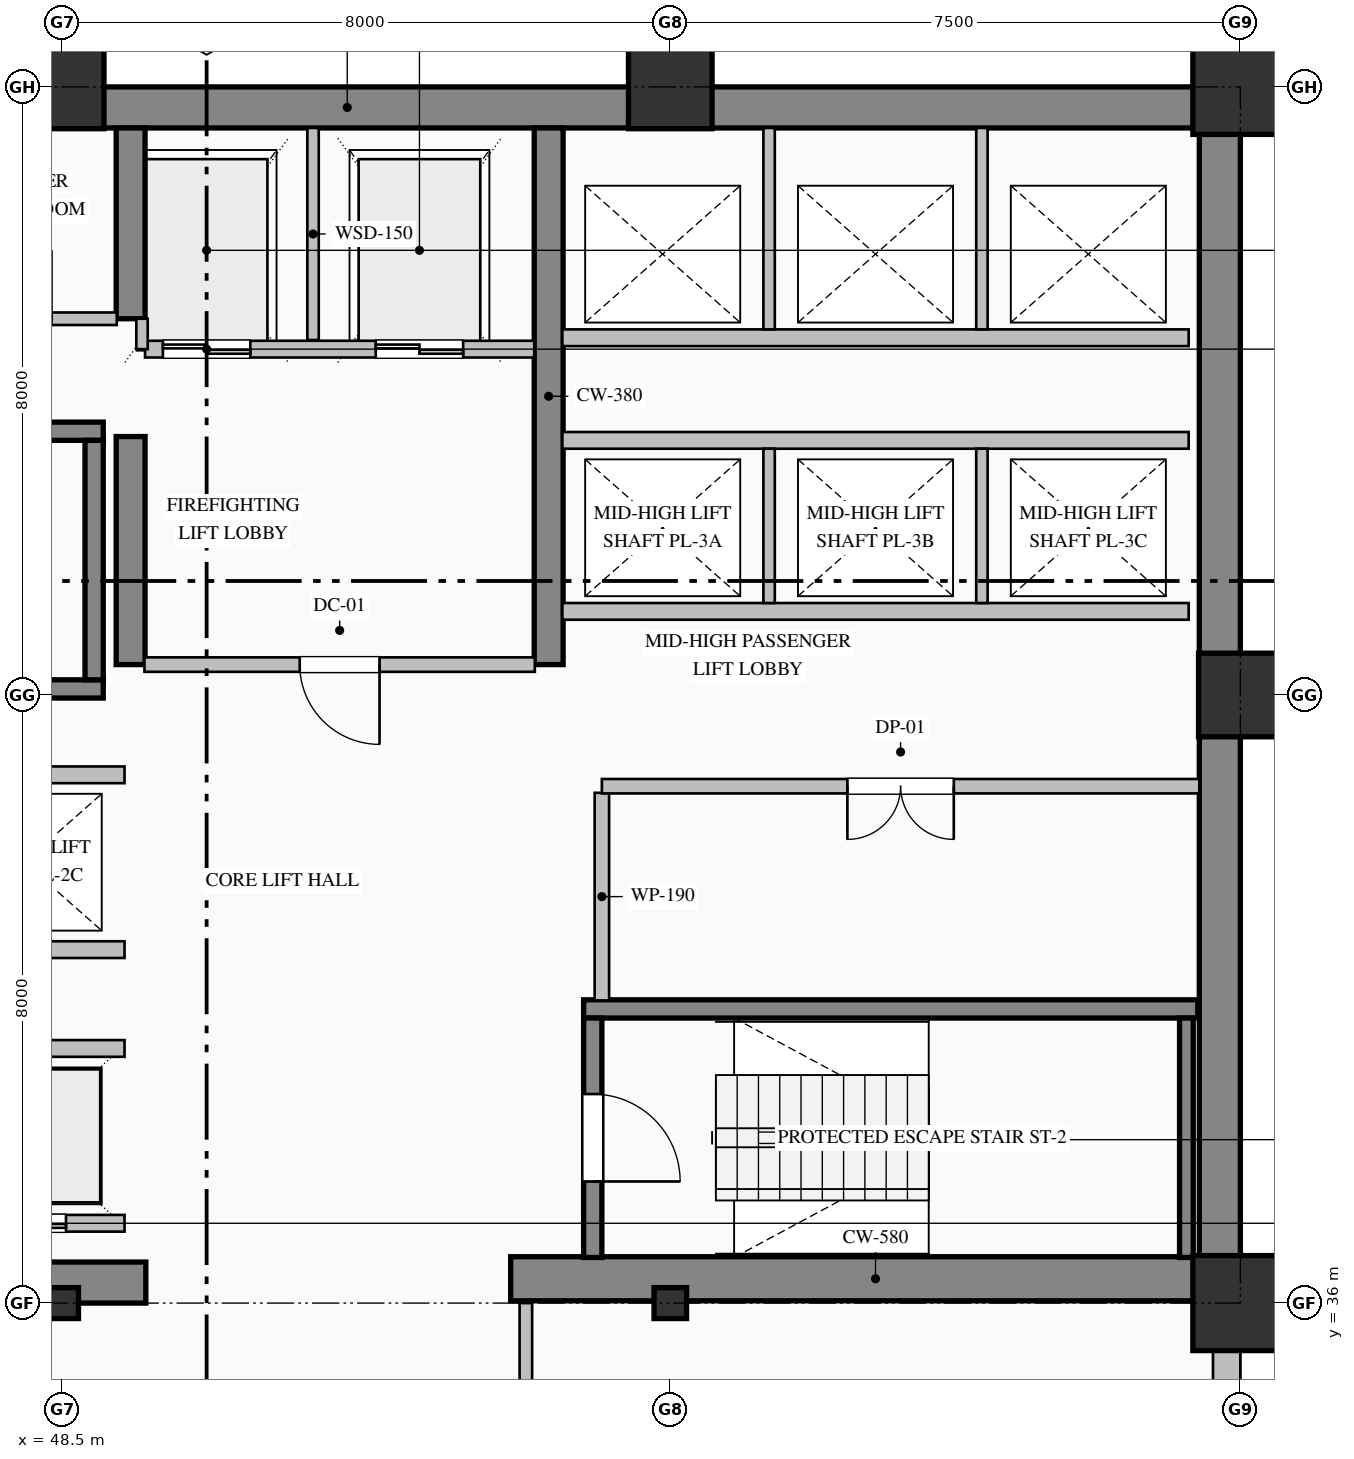
"""IFC4 building model, lengths in metres.
Left out: names, types, materials, properties, quantities, classifications, styles, units other than length and angle.
Written with IfcOpenShell. Run it as: python <this file> out.ifc"""

import sys

from ifc_helpers import new_model, si_unit, direction, frame, frame_2d, origin, origin_2d, place, context, subcontext, project, spatial, rectangle, hollow_rectangle, i_section, extrude, element, fill, save


model = new_model("IFC4")
c1 = context("Model", 3, precision=1e-05, world=origin(), true_north=direction((0.0, 1.0)))
c2 = subcontext(c1, "Body", "Model", "MODEL_VIEW")
j1 = project(units=[si_unit("LENGTHUNIT", "METRE"), si_unit("PLANEANGLEUNIT", "RADIAN")], contexts=[c1])
p1 = place(None, origin())
s1 = spatial("IfcSite", under=j1, at=p1, CompositionType="ELEMENT")
p2 = place(p1, origin())
s2 = spatial("IfcBuilding", under=s1, at=p2, CompositionType="ELEMENT")
p3 = place(p2, frame((0.0, 0.0, 88.2)))
s3 = spatial("IfcBuildingStorey", under=s2, at=p3, CompositionType="ELEMENT", Elevation=88.2)
p4 = place(p3, frame((40.5, 51.73, 0.0), z_axis=(0.0, 0.0, 1.0), x_axis=(1.0, 0.0, 0.0)))
e1 = element("IfcWall", 1, at=p4, inside=s3, PredefinedType="SHEAR", context=c2, shape_type="SweptSolid", body=[
    extrude(rectangle(XDim=23.5, YDim=0.54, at=frame_2d((11.75, 0.0))), origin(), (0.0, 0.0, 1.0), 3.75),
])
p5 = place(p3, frame((63.73, 36.32, 0.0), z_axis=(0.0, 0.0, 1.0), x_axis=(0.0, 1.0, 0.0)))
e2 = element("IfcWall", 2, at=p5, inside=s3, PredefinedType="SHEAR", context=c2, shape_type="SweptSolid", body=[
    extrude(rectangle(XDim=15.14, YDim=0.54, at=frame_2d((7.57, 0.0))), origin(), (0.0, 0.0, 1.0), 3.75),
])
p6 = place(p3, frame((48.2, 36.27, 0.0), z_axis=(0.0, 0.0, 1.0), x_axis=(1.0, 0.0, 0.0)))
e3 = element("IfcWall", 3, at=p6, inside=s3, PredefinedType="SHEAR", context=c2, shape_type="SweptSolid", body=[
    extrude(rectangle(XDim=1.4, YDim=0.54, at=frame_2d((0.7, 0.0))), origin(), (0.0, 0.0, 1.0), 3.75),
])
p7 = place(p3, frame((54.4, 36.32, 0.0), z_axis=(0.0, 0.0, 1.0), x_axis=(1.0, 0.0, 0.0)))
e4 = element("IfcWall", 4, at=p7, inside=s3, PredefinedType="SHEAR", context=c2, shape_type="SweptSolid", body=[
    extrude(rectangle(XDim=9.6, YDim=0.58, at=frame_2d((4.8, 0.0))), origin(), (0.0, 0.0, 1.0), 4.0),
])
p8 = place(p3, frame((49.4, 44.4, 0.0), z_axis=(0.0, 0.0, 1.0), x_axis=(0.0, 1.0, 0.0)))
e5 = element("IfcWall", 5, at=p8, inside=s3, PredefinedType="SHEAR", context=c2, shape_type="SweptSolid", body=[
    extrude(rectangle(XDim=3.0, YDim=0.38, at=frame_2d((1.5, 0.0))), origin(), (0.0, 0.0, 1.0), 3.75),
])
p9 = place(p3, frame((49.4, 48.95, 0.0), z_axis=(0.0, 0.0, 1.0), x_axis=(0.0, 1.0, 0.0)))
e6 = element("IfcWall", 6, at=p9, inside=s3, PredefinedType="SHEAR", context=c2, shape_type="SweptSolid", body=[
    extrude(rectangle(XDim=2.51, YDim=0.38, at=frame_2d((1.255, 0.0))), origin(), (0.0, 0.0, 1.0), 3.75),
])
p10 = place(p3, frame((54.9, 44.4, 0.0), z_axis=(0.0, 0.0, 1.0), x_axis=(0.0, 1.0, 0.0)))
e7 = element("IfcWall", 7, at=p10, inside=s3, PredefinedType="SHEAR", context=c2, shape_type="SweptSolid", body=[
    extrude(rectangle(XDim=7.06, YDim=0.38, at=frame_2d((3.53, 0.0))), origin(), (0.0, 0.0, 1.0), 3.75),
])
p11 = place(p3, frame((48.5, 36.0, 0.0), z_axis=(0.0, 0.0, 1.0), x_axis=(1.0, 0.0, 0.0)))
e8 = element("IfcColumn", 8, at=p11, inside=s3, PredefinedType="COLUMN", context=c2, shape_type="SweptSolid", body=[
    extrude(i_section(OverallWidth=0.407, OverallDepth=0.428, WebThickness=0.02, FlangeThickness=0.035, FilletRadius=0.022, at=origin_2d()), origin(), (0.0, 0.0, 1.0), 4.0),
])
p12 = place(p3, frame((48.5, 52.0, 0.0), z_axis=(0.0, 0.0, 1.0), x_axis=(1.0, 0.0, 0.0)))
e9 = element("IfcColumn", 9, at=p12, inside=s3, PredefinedType="COLUMN", context=c2, shape_type="SweptSolid", body=[
    extrude(hollow_rectangle(XDim=1.1, YDim=1.1, WallThickness=0.04, at=origin_2d()), origin(), (0.0, 0.0, 1.0), 4.0),
])
p13 = place(p3, frame((56.5, 36.0, 0.0), z_axis=(0.0, 0.0, 1.0), x_axis=(1.0, 0.0, 0.0)))
e10 = element("IfcColumn", 10, at=p13, inside=s3, PredefinedType="COLUMN", context=c2, shape_type="SweptSolid", body=[
    extrude(i_section(OverallWidth=0.407, OverallDepth=0.428, WebThickness=0.02, FlangeThickness=0.035, FilletRadius=0.022, at=origin_2d()), origin(), (0.0, 0.0, 1.0), 4.0),
])
p14 = place(p3, frame((56.5, 52.0, 0.0), z_axis=(0.0, 0.0, 1.0), x_axis=(1.0, 0.0, 0.0)))
e11 = element("IfcColumn", 11, at=p14, inside=s3, PredefinedType="COLUMN", context=c2, shape_type="SweptSolid", body=[
    extrude(hollow_rectangle(XDim=1.1, YDim=1.1, WallThickness=0.04, at=origin_2d()), origin(), (0.0, 0.0, 1.0), 4.0),
])
p15 = place(p3, frame((64.0, 36.0, 0.0), z_axis=(0.0, 0.0, 1.0), x_axis=(1.0, 0.0, 0.0)))
e12 = element("IfcColumn", 12, at=p15, inside=s3, PredefinedType="COLUMN", context=c2, shape_type="SweptSolid", body=[
    extrude(hollow_rectangle(XDim=1.25, YDim=1.25, WallThickness=0.045, at=origin_2d()), origin(), (0.0, 0.0, 1.0), 4.0),
])
p16 = place(p3, frame((64.0, 44.0, 0.0), z_axis=(0.0, 0.0, 1.0), x_axis=(1.0, 0.0, 0.0)))
e13 = element("IfcColumn", 13, at=p16, inside=s3, PredefinedType="COLUMN", context=c2, shape_type="SweptSolid", body=[
    extrude(hollow_rectangle(XDim=1.1, YDim=1.1, WallThickness=0.04, at=origin_2d()), origin(), (0.0, 0.0, 1.0), 4.0),
])
p17 = place(p3, frame((64.0, 52.0, 0.0), z_axis=(0.0, 0.0, 1.0), x_axis=(1.0, 0.0, 0.0)))
e14 = element("IfcColumn", 14, at=p17, inside=s3, PredefinedType="COLUMN", context=c2, shape_type="SweptSolid", body=[
    extrude(hollow_rectangle(XDim=1.25, YDim=1.25, WallThickness=0.045, at=origin_2d()), origin(), (0.0, 0.0, 1.0), 4.0),
])
p18 = place(p3, frame((63.82, 36.05, 0.0), z_axis=(0.0, 0.0, 1.0), x_axis=(0.0, -1.0, 0.0)))
e15 = element("IfcWall", 15, at=p18, inside=s3, PredefinedType="SOLIDWALL", context=c2, shape_type="SweptSolid", body=[
    extrude(rectangle(XDim=28.05, YDim=0.36, at=frame_2d((14.025, 0.0))), origin(), (0.0, 0.0, 1.0), 3.25),
])
p19 = place(p18, frame((2.7, 0.0, 0.85)))
e16 = element("IfcOpeningElement", 16, at=p19, cuts=e15, PredefinedType="OPENING", context=c2, shape_type="SweptSolid", body=[
    extrude(rectangle(XDim=1.8, YDim=2.05, at=frame_2d((0.9, 1.025))), frame((0.0, 0.19, 0.0), z_axis=(0.0, -1.0, 0.0), x_axis=(1.0, 0.0, 0.0)), (0.0, 0.0, 1.0), 0.38),
])
p20 = place(p18, frame((13.5, 0.0, 0.85)))
e17 = element("IfcOpeningElement", 17, at=p20, cuts=e15, PredefinedType="OPENING", context=c2, shape_type="SweptSolid", body=[
    extrude(rectangle(XDim=1.8, YDim=2.05, at=frame_2d((0.9, 1.025))), frame((0.0, 0.19, 0.0), z_axis=(0.0, -1.0, 0.0), x_axis=(1.0, 0.0, 0.0)), (0.0, 0.0, 1.0), 0.38),
])
for number, where, z_axis, x_axis in (
    (18, (40.96, 47.47, 0.0), (0.0, 0.0, 1.0), (1.0, 0.0, 0.0)),
    (19, (49.04, 44.08, 0.0), (0.0, 0.0, 1.0), (-1.0, 0.0, 0.0)),
):
    element("IfcWall", number, at=place(p3, frame(where, z_axis=z_axis, x_axis=x_axis)), inside=s3, PredefinedType="SOLIDWALL", context=c2, shape_type="SweptSolid", body=[
        extrude(rectangle(XDim=8.08, YDim=0.24, at=frame_2d((4.04, 0.0))), origin(), (0.0, 0.0, 1.0), 4.0),
    ])
p21 = place(p3, frame((48.92, 44.2, 0.0), z_axis=(0.0, 0.0, 1.0), x_axis=(0.0, 1.0, 0.0)))
e20 = element("IfcWall", 20, at=p21, inside=s3, PredefinedType="SOLIDWALL", context=c2, shape_type="SweptSolid", body=[
    extrude(rectangle(XDim=3.15, YDim=0.24, at=frame_2d((1.575, 0.0))), origin(), (0.0, 0.0, 1.0), 4.0),
])
p22 = place(p3, frame((55.36, 39.87, 0.0), z_axis=(0.0, 0.0, 1.0), x_axis=(1.0, 0.0, 0.0)))
e21 = element("IfcWall", 21, at=p22, inside=s3, PredefinedType="SOLIDWALL", context=c2, shape_type="SweptSolid", body=[
    extrude(rectangle(XDim=8.08, YDim=0.24, at=frame_2d((4.04, 0.0))), origin(), (0.0, 0.0, 1.0), 4.0),
])
p23 = place(p3, frame((55.48, 39.75, 0.0), z_axis=(0.0, 0.0, 1.0), x_axis=(0.0, -1.0, 0.0)))
e22 = element("IfcWall", 22, at=p23, inside=s3, PredefinedType="SOLIDWALL", context=c2, shape_type="SweptSolid", body=[
    extrude(rectangle(XDim=3.15, YDim=0.24, at=frame_2d((1.575, 0.0))), origin(), (0.0, 0.0, 1.0), 4.0),
])
p24 = place(p23, frame((1.0, 0.0, 0.0)))
e23 = element("IfcOpeningElement", 23, at=p24, cuts=e22, PredefinedType="OPENING", context=c2, shape_type="SweptSolid", body=[
    extrude(rectangle(XDim=1.15, YDim=2.2, at=frame_2d((0.575, 1.1))), frame((0.0, 0.13, 0.0), z_axis=(0.0, -1.0, 0.0), x_axis=(1.0, 0.0, 0.0)), (0.0, 0.0, 1.0), 0.26),
])
p25 = place(p3, frame((63.29, 36.6, 0.0), z_axis=(0.0, 0.0, 1.0), x_axis=(0.0, 1.0, 0.0)))
e24 = element("IfcWall", 24, at=p25, inside=s3, PredefinedType="SOLIDWALL", context=c2, shape_type="SweptSolid", body=[
    extrude(rectangle(XDim=3.15, YDim=0.18, at=frame_2d((1.575, 0.0))), origin(), (0.0, 0.0, 1.0), 4.0),
])
p26 = place(p3, frame((54.71, 48.55, 0.0), z_axis=(0.0, 0.0, 1.0), x_axis=(-1.0, 0.0, 0.0)))
e25 = element("IfcWall", 25, at=p26, inside=s3, PredefinedType="PARTITIONING", context=c2, shape_type="SweptSolid", body=[
    extrude(rectangle(XDim=5.12, YDim=0.22, at=frame_2d((2.56, 0.0))), origin(), (0.0, 0.0, 1.0), 3.75),
])
p27 = place(p26, frame((3.735, 0.0, 0.0)))
e26 = element("IfcOpeningElement", 26, at=p27, cuts=e25, PredefinedType="OPENING", context=c2, shape_type="SweptSolid", body=[
    extrude(rectangle(XDim=1.15, YDim=2.2, at=frame_2d((0.575, 1.1))), frame((0.0, 0.12, 0.0), z_axis=(0.0, -1.0, 0.0), x_axis=(1.0, 0.0, 0.0)), (0.0, 0.0, 1.0), 0.24),
])
p28 = place(p26, frame((0.935, 0.0, 0.0)))
e27 = element("IfcOpeningElement", 27, at=p28, cuts=e25, PredefinedType="OPENING", context=c2, shape_type="SweptSolid", body=[
    extrude(rectangle(XDim=1.15, YDim=2.2, at=frame_2d((0.575, 1.1))), frame((0.0, 0.12, 0.0), z_axis=(0.0, -1.0, 0.0), x_axis=(1.0, 0.0, 0.0)), (0.0, 0.0, 1.0), 0.24),
])
p29 = place(p3, frame((51.8, 48.67, 0.0), z_axis=(0.0, 0.0, 1.0), x_axis=(0.0, 1.0, 0.0)))
e28 = element("IfcWall", 28, at=p29, inside=s3, PredefinedType="PARTITIONING", context=c2, shape_type="SweptSolid", body=[
    extrude(rectangle(XDim=2.79, YDim=0.15, at=frame_2d((1.395, 0.0))), origin(), (0.0, 0.0, 1.0), 3.75),
])
p30 = place(p3, frame((49.55, 48.55, 0.0), z_axis=(0.0, 0.0, 1.0), x_axis=(0.0, 1.0, 0.0)))
e29 = element("IfcWall", 29, at=p30, inside=s3, PredefinedType="PARTITIONING", context=c2, shape_type="SweptSolid", body=[
    extrude(rectangle(XDim=0.4, YDim=0.15, at=frame_2d((0.2, 0.0))), origin(), (0.0, 0.0, 1.0), 3.75),
])
p31 = place(p3, frame((49.32, 37.05, 0.0), z_axis=(0.0, 0.0, 1.0), x_axis=(-1.0, 0.0, 0.0)))
e30 = element("IfcWall", 30, at=p31, inside=s3, PredefinedType="PARTITIONING", context=c2, shape_type="SweptSolid", body=[
    extrude(rectangle(XDim=8.24, YDim=0.22, at=frame_2d((4.12, 0.0))), origin(), (0.0, 0.0, 1.0), 3.75),
])
p32 = place(p31, frame((6.37, 0.0, 0.0)))
e31 = element("IfcOpeningElement", 31, at=p32, cuts=e30, PredefinedType="OPENING", context=c2, shape_type="SweptSolid", body=[
    extrude(rectangle(XDim=1.1, YDim=2.2, at=frame_2d((0.55, 1.1))), frame((0.0, 0.12, 0.0), z_axis=(0.0, -1.0, 0.0), x_axis=(1.0, 0.0, 0.0)), (0.0, 0.0, 1.0), 0.24),
])
p33 = place(p31, frame((3.57, 0.0, 0.0)))
e32 = element("IfcOpeningElement", 32, at=p33, cuts=e30, PredefinedType="OPENING", context=c2, shape_type="SweptSolid", body=[
    extrude(rectangle(XDim=1.1, YDim=2.2, at=frame_2d((0.55, 1.1))), frame((0.0, 0.12, 0.0), z_axis=(0.0, -1.0, 0.0), x_axis=(1.0, 0.0, 0.0)), (0.0, 0.0, 1.0), 0.24),
])
p34 = place(p31, frame((0.77, 0.0, 0.0)))
e33 = element("IfcOpeningElement", 33, at=p34, cuts=e30, PredefinedType="OPENING", context=c2, shape_type="SweptSolid", body=[
    extrude(rectangle(XDim=1.1, YDim=2.2, at=frame_2d((0.55, 1.1))), frame((0.0, 0.12, 0.0), z_axis=(0.0, -1.0, 0.0), x_axis=(1.0, 0.0, 0.0)), (0.0, 0.0, 1.0), 0.24),
])
for number, where, z_axis, x_axis in (
    (34, (41.08, 39.35, 0.0), (0.0, 0.0, 1.0), (1.0, 0.0, 0.0)),
    (35, (49.32, 40.65, 0.0), (0.0, 0.0, 1.0), (-1.0, 0.0, 0.0)),
    (36, (41.08, 42.95, 0.0), (0.0, 0.0, 1.0), (1.0, 0.0, 0.0)),
    (37, (63.32, 45.1, 0.0), (0.0, 0.0, 1.0), (-1.0, 0.0, 0.0)),
    (38, (55.08, 47.35, 0.0), (0.0, 0.0, 1.0), (1.0, 0.0, 0.0)),
):
    element("IfcWall", number, at=place(p3, frame(where, z_axis=z_axis, x_axis=x_axis)), inside=s3, PredefinedType="PARTITIONING", context=c2, shape_type="SweptSolid", body=[
        extrude(rectangle(XDim=8.24, YDim=0.22, at=frame_2d((4.12, 0.0))), origin(), (0.0, 0.0, 1.0), 3.75),
    ])
for number, where, z_axis, x_axis in (
    (39, (57.8, 45.21, 0.0), (0.0, 0.0, 1.0), (0.0, 1.0, 0.0)),
    (40, (60.6, 45.21, 0.0), (0.0, 0.0, 1.0), (0.0, 1.0, 0.0)),
):
    element("IfcWall", number, at=place(p3, frame(where, z_axis=z_axis, x_axis=x_axis)), inside=s3, PredefinedType="PARTITIONING", context=c2, shape_type="SweptSolid", body=[
        extrude(rectangle(XDim=2.03, YDim=0.15, at=frame_2d((1.015, 0.0))), origin(), (0.0, 0.0, 1.0), 3.75),
    ])
p35 = place(p3, frame((63.32, 48.7, 0.0), z_axis=(0.0, 0.0, 1.0), x_axis=(-1.0, 0.0, 0.0)))
e41 = element("IfcWall", 41, at=p35, inside=s3, PredefinedType="PARTITIONING", context=c2, shape_type="SweptSolid", body=[
    extrude(rectangle(XDim=8.24, YDim=0.22, at=frame_2d((4.12, 0.0))), origin(), (0.0, 0.0, 1.0), 3.75),
])
for number, where, z_axis, x_axis in (
    (42, (57.8, 48.81, 0.0), (0.0, 0.0, 1.0), (0.0, 1.0, 0.0)),
    (43, (60.6, 48.81, 0.0), (0.0, 0.0, 1.0), (0.0, 1.0, 0.0)),
):
    element("IfcWall", number, at=place(p3, frame(where, z_axis=z_axis, x_axis=x_axis)), inside=s3, PredefinedType="PARTITIONING", context=c2, shape_type="SweptSolid", body=[
        extrude(rectangle(XDim=2.65, YDim=0.15, at=frame_2d((1.325, 0.0))), origin(), (0.0, 0.0, 1.0), 3.75),
    ])
p36 = place(p3, frame((46.6, 48.95, 0.0), z_axis=(0.0, 0.0, 1.0), x_axis=(1.0, 0.0, 0.0)))
e44 = element("IfcWall", 44, at=p36, inside=s3, PredefinedType="PARTITIONING", context=c2, shape_type="SweptSolid", body=[
    extrude(rectangle(XDim=2.618, YDim=0.165, at=frame_2d((1.309, 0.0))), origin(), (0.0, 0.0, 1.0), 3.75),
])
p37 = place(p36, frame((0.859, 0.0, 0.0)))
e45 = element("IfcOpeningElement", 45, at=p37, cuts=e44, PredefinedType="OPENING", context=c2, shape_type="SweptSolid", body=[
    extrude(rectangle(XDim=0.9, YDim=2.15, at=frame_2d((0.45, 1.075))), frame((0.0, 0.093, 0.0), z_axis=(0.0, -1.0, 0.0), x_axis=(1.0, 0.0, 0.0)), (0.0, 0.0, 1.0), 0.185),
])
p38 = place(p3, frame((54.718, 44.4, 0.0), z_axis=(0.0, 0.0, 1.0), x_axis=(-1.0, 0.0, 0.0)))
e46 = element("IfcWall", 46, at=p38, inside=s3, PredefinedType="PARTITIONING", context=c2, shape_type="SweptSolid", body=[
    extrude(rectangle(XDim=5.136, YDim=0.19, at=frame_2d((2.568, 0.0))), origin(), (0.0, 0.0, 1.0), 3.75),
])
p39 = place(p38, frame((2.043, 0.0, 0.0)))
e47 = element("IfcOpeningElement", 47, at=p39, cuts=e46, PredefinedType="OPENING", context=c2, shape_type="SweptSolid", body=[
    extrude(rectangle(XDim=1.05, YDim=2.15, at=frame_2d((0.525, 1.075))), frame((0.0, 0.105, 0.0), z_axis=(0.0, -1.0, 0.0), x_axis=(1.0, 0.0, 0.0)), (0.0, 0.0, 1.0), 0.21),
])
p40 = place(p3, frame((55.6, 42.713, 0.0), z_axis=(0.0, 0.0, 1.0), x_axis=(0.0, -1.0, 0.0)))
e48 = element("IfcWall", 48, at=p40, inside=s3, PredefinedType="PARTITIONING", context=c2, shape_type="SweptSolid", body=[
    extrude(rectangle(XDim=2.731, YDim=0.19, at=frame_2d((1.365, 0.0))), origin(), (0.0, 0.0, 1.0), 3.75),
])
p41 = place(p3, frame((63.46, 42.8, 0.0), z_axis=(0.0, 0.0, 1.0), x_axis=(-1.0, 0.0, 0.0)))
e49 = element("IfcWall", 49, at=p41, inside=s3, PredefinedType="PARTITIONING", context=c2, shape_type="SweptSolid", body=[
    extrude(rectangle(XDim=7.86, YDim=0.19, at=frame_2d((3.93, 0.0))), origin(), (0.0, 0.0, 1.0), 3.75),
])
p42 = place(p41, frame((3.23, 0.0, 0.0)))
e50 = element("IfcOpeningElement", 50, at=p42, cuts=e49, PredefinedType="OPENING", context=c2, shape_type="SweptSolid", body=[
    extrude(rectangle(XDim=1.4, YDim=2.25, at=frame_2d((0.7, 1.125))), frame((0.0, 0.105, 0.0), z_axis=(0.0, -1.0, 0.0), x_axis=(1.0, 0.0, 0.0)), (0.0, 0.0, 1.0), 0.21),
])
p43 = place(p3, frame((54.6, 36.0, 0.0), z_axis=(0.0, 0.0, 1.0), x_axis=(0.0, -1.0, 0.0)))
e51 = element("IfcWall", 51, at=p43, inside=s3, PredefinedType="PARTITIONING", context=c2, shape_type="SweptSolid", body=[
    extrude(rectangle(XDim=2.125, YDim=0.165, at=frame_2d((1.063, 0.0))), origin(), (0.0, 0.0, 1.0), 3.75),
])
p44 = place(p24, origin())
e52 = element("IfcDoor", 52, at=p44, inside=s3, OperationType="SINGLE_SWING_RIGHT", PredefinedType="DOOR", context=c2, shape_type="SweptSolid", body=[
    extrude(rectangle(XDim=1.15, YDim=2.2, at=frame_2d((0.575, 1.1))), frame((0.0, 0.025, 0.0), z_axis=(0.0, -1.0, 0.0), x_axis=(1.0, 0.0, 0.0)), (0.0, 0.0, 1.0), 0.05),
])
fill(e23, e52)
p45 = place(p27, origin())
e53 = element("IfcDoor", 53, at=p45, inside=s3, OperationType="DOUBLE_DOOR_SLIDING", PredefinedType="DOOR", context=c2, shape_type="SweptSolid", body=[
    extrude(rectangle(XDim=1.15, YDim=2.2, at=frame_2d((0.575, 1.1))), frame((0.0, 0.025, 0.0), z_axis=(0.0, -1.0, 0.0), x_axis=(1.0, 0.0, 0.0)), (0.0, 0.0, 1.0), 0.05),
])
fill(e26, e53)
p46 = place(p28, origin())
e54 = element("IfcDoor", 54, at=p46, inside=s3, OperationType="DOUBLE_DOOR_SLIDING", PredefinedType="DOOR", context=c2, shape_type="SweptSolid", body=[
    extrude(rectangle(XDim=1.15, YDim=2.2, at=frame_2d((0.575, 1.1))), frame((0.0, 0.025, 0.0), z_axis=(0.0, -1.0, 0.0), x_axis=(1.0, 0.0, 0.0)), (0.0, 0.0, 1.0), 0.05),
])
fill(e27, e54)
p47 = place(p34, origin())
e55 = element("IfcDoor", 55, at=p47, inside=s3, OperationType="DOUBLE_DOOR_SLIDING", PredefinedType="DOOR", context=c2, shape_type="SweptSolid", body=[
    extrude(rectangle(XDim=1.1, YDim=2.2, at=frame_2d((0.55, 1.1))), frame((0.0, 0.025, 0.0), z_axis=(0.0, -1.0, 0.0), x_axis=(1.0, 0.0, 0.0)), (0.0, 0.0, 1.0), 0.05),
])
fill(e33, e55)
p48 = place(p39, origin())
e56 = element("IfcDoor", 56, at=p48, inside=s3, OperationType="SINGLE_SWING_LEFT", PredefinedType="DOOR", context=c2, shape_type="SweptSolid", body=[
    extrude(rectangle(XDim=1.05, YDim=2.15, at=frame_2d((0.525, 1.075))), frame((0.0, 0.025, 0.0), z_axis=(0.0, -1.0, 0.0), x_axis=(1.0, 0.0, 0.0)), (0.0, 0.0, 1.0), 0.05),
])
fill(e47, e56)
p49 = place(p42, origin())
e57 = element("IfcDoor", 57, at=p49, inside=s3, OperationType="DOUBLE_DOOR_SINGLE_SWING", PredefinedType="DOOR", context=c2, shape_type="SweptSolid", body=[
    extrude(rectangle(XDim=1.4, YDim=2.25, at=frame_2d((0.7, 1.125))), frame((0.0, 0.025, 0.0), z_axis=(0.0, -1.0, 0.0), x_axis=(1.0, 0.0, 0.0)), (0.0, 0.0, 1.0), 0.05),
])
fill(e50, e57)
save(model, sys.argv[1])
